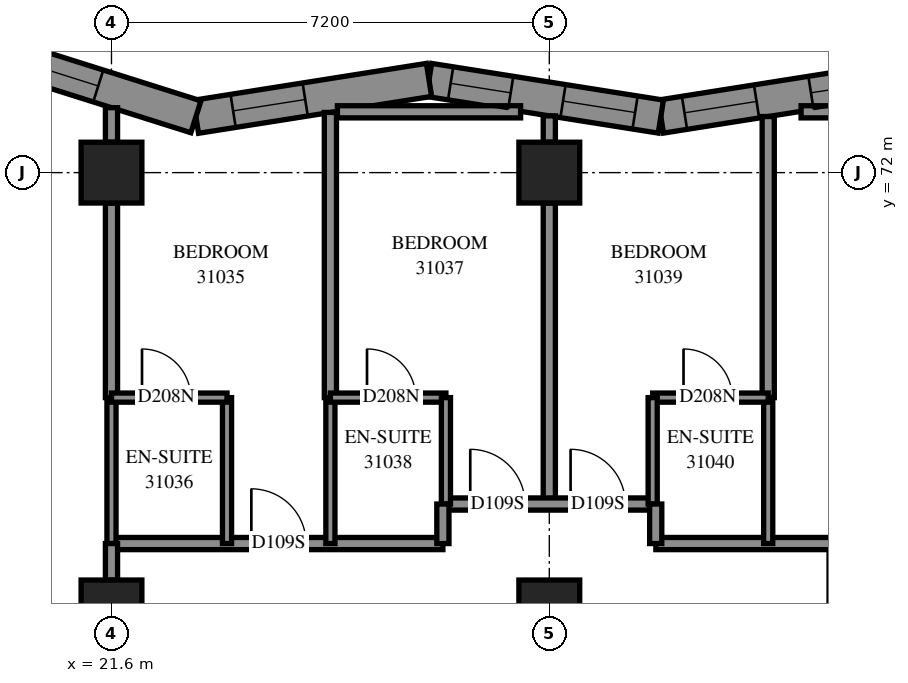
"""IFC4 building model, lengths in metres.
Left out: names, types, materials, properties, quantities, classifications, styles, units other than length and angle.
Written with IfcOpenShell. Run it as: python <this file> out.ifc"""

import sys

from ifc_helpers import new_model, si_unit, direction, frame, frame_2d, origin, origin_2d, place, context, subcontext, project, spatial, polyline, rectangle, outline, extrude, element, fill, save


model = new_model("IFC4")
c1 = context("Model", 3, precision=1e-05, world=origin(), true_north=direction((0.0, 1.0)))
c2 = subcontext(c1, "Body", "Model", "MODEL_VIEW")
j1 = project(units=[si_unit("LENGTHUNIT", "METRE"), si_unit("PLANEANGLEUNIT", "RADIAN")], contexts=[c1])
p1 = place(None, origin())
s1 = spatial("IfcSite", under=j1, at=p1, CompositionType="ELEMENT")
p2 = place(p1, origin())
s2 = spatial("IfcBuilding", under=s1, at=p2, CompositionType="ELEMENT")
p3 = place(p2, frame((0.0, 0.0, 115.2)))
s3 = spatial("IfcBuildingStorey", under=s2, at=p3, CompositionType="ELEMENT", Elevation=115.2)
for number, where, z_axis, x_axis in (
    (1, (21.6, 64.8, 0.0), (0.0, 0.0, 1.0), (1.0, 0.0, 0.0)),
    (2, (21.6, 72.0, 0.0), (0.0, 0.0, 1.0), (1.0, 0.0, 0.0)),
    (3, (28.8, 64.8, 0.0), (0.0, 0.0, 1.0), (1.0, 0.0, 0.0)),
    (4, (28.8, 72.0, 0.0), (0.0, 0.0, 1.0), (1.0, 0.0, 0.0)),
):
    element("IfcColumn", number, at=place(p3, frame(where, z_axis=z_axis, x_axis=x_axis)), inside=s3, PredefinedType="COLUMN", context=c2, shape_type="SweptSolid", body=[
        extrude(rectangle(XDim=1.0, YDim=1.0, at=origin_2d()), origin(), (0.0, 0.0, 1.0), 3.1),
    ])
p4 = place(p3, frame((34.447, 73.525, 0.0), z_axis=(0.0, 0.0, 1.0), x_axis=(-0.9877213372, -0.1562259905, 0.0)))
e5 = element("IfcWall", 5, at=p4, inside=s3, PredefinedType="SOLIDWALL", context=c2, shape_type="SweptSolid", body=[
    extrude(outline(polyline([(-0.043, -0.275), (3.816, -0.275), (3.903, 0.275), (0.043, 0.275), (-0.043, -0.275)])), origin(), (0.0, 0.0, 1.0), 3.1),
])
p5 = place(p4, frame((2.266, 0.0, 0.5)))
e6 = element("IfcOpeningElement", 6, at=p5, cuts=e5, PredefinedType="OPENING", context=c2, shape_type="SweptSolid", body=[
    extrude(rectangle(XDim=1.2, YDim=2.45, at=frame_2d((0.6, 1.225))), frame((0.0, 0.285, 0.0), z_axis=(0.0, -1.0, 0.0), x_axis=(1.0, 0.0, 0.0)), (0.0, 0.0, 1.0), 0.57),
])
p6 = place(p4, frame((0.36, 0.0, 0.45)))
e7 = element("IfcOpeningElement", 7, at=p6, cuts=e5, PredefinedType="OPENING", context=c2, shape_type="SweptSolid", body=[
    extrude(rectangle(XDim=1.0, YDim=2.5, at=frame_2d((0.5, 1.25))), frame((0.0, 0.285, 0.0), z_axis=(0.0, -1.0, 0.0), x_axis=(1.0, 0.0, 0.0)), (0.0, 0.0, 1.0), 0.57),
])
p7 = place(p3, frame((30.634, 72.922, 0.0), z_axis=(0.0, 0.0, 1.0), x_axis=(-0.9877213372, 0.1562259905, 0.0)))
e8 = element("IfcWall", 8, at=p7, inside=s3, PredefinedType="SOLIDWALL", context=c2, shape_type="SweptSolid", body=[
    extrude(outline(polyline([(0.043, -0.275), (3.903, -0.275), (3.816, 0.275), (-0.043, 0.275), (0.043, -0.275)])), origin(), (0.0, 0.0, 1.0), 3.1),
])
p8 = place(p7, frame((0.428, 0.0, 0.5)))
e9 = element("IfcOpeningElement", 9, at=p8, cuts=e8, PredefinedType="OPENING", context=c2, shape_type="SweptSolid", body=[
    extrude(rectangle(XDim=1.2, YDim=2.45, at=frame_2d((0.6, 1.225))), frame((0.0, 0.285, 0.0), z_axis=(0.0, -1.0, 0.0), x_axis=(1.0, 0.0, 0.0)), (0.0, 0.0, 1.0), 0.57),
])
p9 = place(p7, frame((2.5, 0.0, 0.45)))
e10 = element("IfcOpeningElement", 10, at=p9, cuts=e8, PredefinedType="OPENING", context=c2, shape_type="SweptSolid", body=[
    extrude(rectangle(XDim=1.0, YDim=2.5, at=frame_2d((0.5, 1.25))), frame((0.0, 0.285, 0.0), z_axis=(0.0, -1.0, 0.0), x_axis=(1.0, 0.0, 0.0)), (0.0, 0.0, 1.0), 0.57),
])
p10 = place(p3, frame((26.822, 73.525, 0.0), z_axis=(0.0, 0.0, 1.0), x_axis=(-0.9877221932, -0.1562205785, 0.0)))
e11 = element("IfcWall", 11, at=p10, inside=s3, PredefinedType="SOLIDWALL", context=c2, shape_type="SweptSolid", body=[
    extrude(outline(polyline([(-0.043, -0.275), (3.816, -0.275), (3.946, 0.275), (0.043, 0.275), (-0.043, -0.275)])), origin(), (0.0, 0.0, 1.0), 3.1),
])
p11 = place(p10, frame((2.062, 0.0, 0.5)))
e12 = element("IfcOpeningElement", 12, at=p11, cuts=e11, PredefinedType="OPENING", context=c2, shape_type="SweptSolid", body=[
    extrude(rectangle(XDim=1.2, YDim=2.45, at=frame_2d((0.6, 1.225))), frame((0.0, 0.285, 0.0), z_axis=(0.0, -1.0, 0.0), x_axis=(1.0, 0.0, 0.0)), (0.0, 0.0, 1.0), 0.57),
])
p12 = place(p3, frame((22.988, 72.918, 0.0), z_axis=(0.0, 0.0, 1.0), x_axis=(-0.9536482224, 0.3009236912, 0.0)))
e13 = element("IfcWall", 13, at=p12, inside=s3, PredefinedType="SOLIDWALL", context=c2, shape_type="SweptSolid", body=[
    extrude(outline(polyline([(0.065, -0.275), (4.062, -0.275), (3.312, 0.275), (-0.065, 0.275), (0.065, -0.275)])), origin(), (0.0, 0.0, 1.0), 3.1),
])
p13 = place(p12, frame((1.684, 0.0, 0.5)))
e14 = element("IfcOpeningElement", 14, at=p13, cuts=e13, PredefinedType="OPENING", context=c2, shape_type="SweptSolid", body=[
    extrude(rectangle(XDim=1.2, YDim=2.45, at=frame_2d((0.6, 1.225))), frame((0.0, 0.285, 0.0), z_axis=(0.0, -1.0, 0.0), x_axis=(1.0, 0.0, 0.0)), (0.0, 0.0, 1.0), 0.57),
])
p14 = place(p3, frame((21.6, 65.9, 0.0), z_axis=(0.0, 0.0, 1.0), x_axis=(1.0, 0.0, 0.0)))
e15 = element("IfcWall", 15, at=p14, inside=s3, PredefinedType="PARTITIONING", context=c2, shape_type="SweptSolid", body=[
    extrude(rectangle(XDim=5.45, YDim=0.2, at=frame_2d((2.725, 0.0))), origin(), (0.0, 0.0, 1.0), 3.1),
])
p15 = place(p14, frame((2.3, 0.0, 0.0)))
e16 = element("IfcOpeningElement", 16, at=p15, cuts=e15, PredefinedType="OPENING", context=c2, shape_type="SweptSolid", body=[
    extrude(rectangle(XDim=0.9, YDim=2.1, at=frame_2d((0.45, 1.05))), frame((0.0, 0.11, 0.0), z_axis=(0.0, -1.0, 0.0), x_axis=(1.0, 0.0, 0.0)), (0.0, 0.0, 1.0), 0.22),
])
p16 = place(p3, frame((28.8, 66.55, 0.0), z_axis=(0.0, 0.0, 1.0), x_axis=(0.0, 1.0, 0.0)))
e17 = element("IfcWall", 17, at=p16, inside=s3, PredefinedType="PARTITIONING", context=c2, shape_type="SweptSolid", body=[
    extrude(rectangle(XDim=4.95, YDim=0.2, at=frame_2d((2.475, 0.0))), origin(), (0.0, 0.0, 1.0), 3.1),
])
p17 = place(p3, frame((25.2, 68.3, 0.0), z_axis=(0.0, 0.0, 1.0), x_axis=(0.0, 1.0, 0.0)))
e18 = element("IfcWall", 18, at=p17, inside=s3, PredefinedType="PARTITIONING", context=c2, shape_type="SweptSolid", body=[
    extrude(rectangle(XDim=4.69, YDim=0.2, at=frame_2d((2.345, 0.0))), origin(), (0.0, 0.0, 1.0), 3.1),
])
p18 = place(p3, frame((32.4, 68.3, 0.0), z_axis=(0.0, 0.0, 1.0), x_axis=(0.0, 1.0, 0.0)))
e19 = element("IfcWall", 19, at=p18, inside=s3, PredefinedType="PARTITIONING", context=c2, shape_type="SweptSolid", body=[
    extrude(rectangle(XDim=4.622, YDim=0.2, at=frame_2d((2.311, 0.0))), origin(), (0.0, 0.0, 1.0), 3.1),
])
p19 = place(p3, frame((27.1, 66.55, 0.0), z_axis=(0.0, 0.0, 1.0), x_axis=(1.0, 0.0, 0.0)))
e20 = element("IfcWall", 20, at=p19, inside=s3, PredefinedType="PARTITIONING", context=c2, shape_type="SweptSolid", body=[
    extrude(rectangle(XDim=3.4, YDim=0.2, at=frame_2d((1.7, 0.0))), origin(), (0.0, 0.0, 1.0), 3.1),
])
p20 = place(p19, frame((0.4, 0.0, 0.0)))
e21 = element("IfcOpeningElement", 21, at=p20, cuts=e20, PredefinedType="OPENING", context=c2, shape_type="SweptSolid", body=[
    extrude(rectangle(XDim=0.9, YDim=2.1, at=frame_2d((0.45, 1.05))), frame((0.0, 0.11, 0.0), z_axis=(0.0, -1.0, 0.0), x_axis=(1.0, 0.0, 0.0)), (0.0, 0.0, 1.0), 0.22),
])
p21 = place(p19, frame((2.05, 0.0, 0.0)))
e22 = element("IfcOpeningElement", 22, at=p21, cuts=e20, PredefinedType="OPENING", context=c2, shape_type="SweptSolid", body=[
    extrude(rectangle(XDim=0.9, YDim=2.1, at=frame_2d((0.45, 1.05))), frame((0.0, 0.11, 0.0), z_axis=(0.0, -1.0, 0.0), x_axis=(1.0, 0.0, 0.0)), (0.0, 0.0, 1.0), 0.22),
])
p22 = place(p3, frame((21.6, 68.3, 0.0), z_axis=(0.0, 0.0, 1.0), x_axis=(0.0, 1.0, 0.0)))
e23 = element("IfcWall", 23, at=p22, inside=s3, PredefinedType="PARTITIONING", context=c2, shape_type="SweptSolid", body=[
    extrude(rectangle(XDim=3.2, YDim=0.2, at=frame_2d((1.6, 0.0))), origin(), (0.0, 0.0, 1.0), 2.6),
])
for number, where, z_axis, x_axis in (
    (24, (25.316, 73.0, 0.0), (0.0, 0.0, 1.0), (1.0, 0.0, 0.0)),
    (25, (32.94, 73.0, 0.0), (0.0, 0.0, 1.0), (1.0, 0.0, 0.0)),
):
    element("IfcWall", number, at=place(p3, frame(where, z_axis=z_axis, x_axis=x_axis)), inside=s3, PredefinedType="PARTITIONING", context=c2, shape_type="SweptSolid", body=[
        extrude(rectangle(XDim=3.013, YDim=0.2, at=frame_2d((1.506, 0.0))), origin(), (0.0, 0.0, 1.0), 3.1),
    ])
p23 = place(p3, frame((30.552, 65.9, 0.0), z_axis=(0.0, 0.0, 1.0), x_axis=(1.0, 0.0, 0.0)))
e26 = element("IfcWall", 26, at=p23, inside=s3, PredefinedType="PARTITIONING", context=c2, shape_type="SweptSolid", body=[
    extrude(rectangle(XDim=2.948, YDim=0.2, at=frame_2d((1.474, 0.0))), origin(), (0.0, 0.0, 1.0), 3.1),
])
p24 = place(p3, frame((21.6, 65.9, 0.0), z_axis=(0.0, 0.0, 1.0), x_axis=(0.0, 1.0, 0.0)))
e27 = element("IfcWall", 27, at=p24, inside=s3, PredefinedType="PARTITIONING", context=c2, shape_type="SweptSolid", body=[
    extrude(rectangle(XDim=2.4, YDim=0.15, at=frame_2d((1.2, 0.0))), origin(), (0.0, 0.0, 1.0), 2.6),
])
for number, where, z_axis, x_axis in (
    (28, (23.5, 65.9, 0.0), (0.0, 0.0, 1.0), (0.0, 1.0, 0.0)),
    (29, (25.2, 65.9, 0.0), (0.0, 0.0, 1.0), (0.0, 1.0, 0.0)),
    (30, (32.4, 65.9, 0.0), (0.0, 0.0, 1.0), (0.0, 1.0, 0.0)),
):
    element("IfcWall", number, at=place(p3, frame(where, z_axis=z_axis, x_axis=x_axis)), inside=s3, PredefinedType="PARTITIONING", context=c2, shape_type="SweptSolid", body=[
        extrude(rectangle(XDim=2.4, YDim=0.15, at=frame_2d((1.2, 0.0))), origin(), (0.0, 0.0, 1.0), 3.1),
    ])
p25 = place(p3, frame((25.2, 68.3, 0.0), z_axis=(0.0, 0.0, 1.0), x_axis=(1.0, 0.0, 0.0)))
e31 = element("IfcWall", 31, at=p25, inside=s3, PredefinedType="PARTITIONING", context=c2, shape_type="SweptSolid", body=[
    extrude(rectangle(XDim=1.9, YDim=0.15, at=frame_2d((0.95, 0.0))), origin(), (0.0, 0.0, 1.0), 3.1),
])
p26 = place(p25, frame((0.602, 0.0, 0.0)))
e32 = element("IfcOpeningElement", 32, at=p26, cuts=e31, PredefinedType="OPENING", context=c2, shape_type="SweptSolid", body=[
    extrude(rectangle(XDim=0.8, YDim=2.1, at=frame_2d((0.4, 1.05))), frame((0.0, 0.085, 0.0), z_axis=(0.0, -1.0, 0.0), x_axis=(1.0, 0.0, 0.0)), (0.0, 0.0, 1.0), 0.17),
])
p27 = place(p3, frame((21.6, 68.3, 0.0), z_axis=(0.0, 0.0, 1.0), x_axis=(1.0, 0.0, 0.0)))
e33 = element("IfcWall", 33, at=p27, inside=s3, PredefinedType="PARTITIONING", context=c2, shape_type="SweptSolid", body=[
    extrude(rectangle(XDim=1.9, YDim=0.15, at=frame_2d((0.95, 0.0))), origin(), (0.0, 0.0, 1.0), 3.1),
])
p28 = place(p27, frame((0.502, 0.0, 0.0)))
e34 = element("IfcOpeningElement", 34, at=p28, cuts=e33, PredefinedType="OPENING", context=c2, shape_type="SweptSolid", body=[
    extrude(rectangle(XDim=0.8, YDim=2.1, at=frame_2d((0.4, 1.05))), frame((0.0, 0.085, 0.0), z_axis=(0.0, -1.0, 0.0), x_axis=(1.0, 0.0, 0.0)), (0.0, 0.0, 1.0), 0.17),
])
p29 = place(p3, frame((30.5, 68.3, 0.0), z_axis=(0.0, 0.0, 1.0), x_axis=(1.0, 0.0, 0.0)))
e35 = element("IfcWall", 35, at=p29, inside=s3, PredefinedType="PARTITIONING", context=c2, shape_type="SweptSolid", body=[
    extrude(rectangle(XDim=1.9, YDim=0.15, at=frame_2d((0.95, 0.0))), origin(), (0.0, 0.0, 1.0), 3.1),
])
p30 = place(p29, frame((0.507, 0.0, 0.0)))
e36 = element("IfcOpeningElement", 36, at=p30, cuts=e35, PredefinedType="OPENING", context=c2, shape_type="SweptSolid", body=[
    extrude(rectangle(XDim=0.8, YDim=2.1, at=frame_2d((0.4, 1.05))), frame((0.0, 0.085, 0.0), z_axis=(0.0, -1.0, 0.0), x_axis=(1.0, 0.0, 0.0)), (0.0, 0.0, 1.0), 0.17),
])
for number, where, z_axis, x_axis in (
    (37, (27.1, 66.55, 0.0), (0.0, 0.0, 1.0), (0.0, 1.0, 0.0)),
    (38, (30.5, 66.55, 0.0), (0.0, 0.0, 1.0), (0.0, 1.0, 0.0)),
):
    element("IfcWall", number, at=place(p3, frame(where, z_axis=z_axis, x_axis=x_axis)), inside=s3, PredefinedType="PARTITIONING", context=c2, shape_type="SweptSolid", body=[
        extrude(rectangle(XDim=1.75, YDim=0.15, at=frame_2d((0.875, 0.0))), origin(), (0.0, 0.0, 1.0), 3.1),
    ])
for number, where, z_axis, x_axis in (
    (39, (27.05, 65.9, 0.0), (0.0, 0.0, 1.0), (0.0, 1.0, 0.0)),
    (40, (30.55, 65.9, 0.0), (0.0, 0.0, 1.0), (0.0, 1.0, 0.0)),
):
    element("IfcWall", number, at=place(p3, frame(where, z_axis=z_axis, x_axis=x_axis)), inside=s3, PredefinedType="PARTITIONING", context=c2, shape_type="SweptSolid", body=[
        extrude(rectangle(XDim=0.65, YDim=0.2, at=frame_2d((0.325, 0.0))), origin(), (0.0, 0.0, 1.0), 3.1),
    ])
p31 = place(p3, frame((21.6, 65.3, 0.0), z_axis=(0.0, 0.0, 1.0), x_axis=(0.0, 1.0, 0.0)))
e41 = element("IfcWall", 41, at=p31, inside=s3, PredefinedType="PARTITIONING", context=c2, shape_type="SweptSolid", body=[
    extrude(rectangle(XDim=0.6, YDim=0.2, at=frame_2d((0.3, 0.0))), origin(), (0.0, 0.0, 1.0), 2.6),
])
p32 = place(p3, frame((21.6, 72.5, 0.0), z_axis=(0.0, 0.0, 1.0), x_axis=(0.0, 1.0, 0.0)))
e42 = element("IfcWall", 42, at=p32, inside=s3, PredefinedType="PARTITIONING", context=c2, shape_type="SweptSolid", body=[
    extrude(rectangle(XDim=0.568, YDim=0.2, at=frame_2d((0.284, 0.0))), origin(), (0.0, 0.0, 1.0), 3.1),
])
p33 = place(p3, frame((28.8, 72.5, 0.0), z_axis=(0.0, 0.0, 1.0), x_axis=(0.0, 1.0, 0.0)))
e43 = element("IfcWall", 43, at=p33, inside=s3, PredefinedType="PARTITIONING", context=c2, shape_type="SweptSolid", body=[
    extrude(rectangle(XDim=0.433, YDim=0.2, at=frame_2d((0.217, 0.0))), origin(), (0.0, 0.0, 1.0), 3.1),
])
p34 = place(p5, origin())
e44 = element("IfcWindow", 44, at=p34, inside=s3, PartitioningType="SINGLE_PANEL", PredefinedType="WINDOW", context=c2, shape_type="SweptSolid", body=[
    extrude(rectangle(XDim=1.2, YDim=2.45, at=frame_2d((0.6, 1.225))), frame((0.0, 0.155, 0.0), z_axis=(0.0, -1.0, 0.0), x_axis=(1.0, 0.0, 0.0)), (0.0, 0.0, 1.0), 0.06),
])
fill(e6, e44)
p35 = place(p8, origin())
e45 = element("IfcWindow", 45, at=p35, inside=s3, PartitioningType="SINGLE_PANEL", PredefinedType="WINDOW", context=c2, shape_type="SweptSolid", body=[
    extrude(rectangle(XDim=1.2, YDim=2.45, at=frame_2d((0.6, 1.225))), frame((0.0, 0.155, 0.0), z_axis=(0.0, -1.0, 0.0), x_axis=(1.0, 0.0, 0.0)), (0.0, 0.0, 1.0), 0.06),
])
fill(e9, e45)
p36 = place(p11, origin())
e46 = element("IfcWindow", 46, at=p36, inside=s3, PartitioningType="SINGLE_PANEL", PredefinedType="WINDOW", context=c2, shape_type="SweptSolid", body=[
    extrude(rectangle(XDim=1.2, YDim=2.45, at=frame_2d((0.6, 1.225))), frame((0.0, 0.155, 0.0), z_axis=(0.0, -1.0, 0.0), x_axis=(1.0, 0.0, 0.0)), (0.0, 0.0, 1.0), 0.06),
])
fill(e12, e46)
p37 = place(p13, origin())
e47 = element("IfcWindow", 47, at=p37, inside=s3, PartitioningType="SINGLE_PANEL", PredefinedType="WINDOW", context=c2, shape_type="SweptSolid", body=[
    extrude(rectangle(XDim=1.2, YDim=2.45, at=frame_2d((0.6, 1.225))), frame((0.0, 0.155, 0.0), z_axis=(0.0, -1.0, 0.0), x_axis=(1.0, 0.0, 0.0)), (0.0, 0.0, 1.0), 0.06),
])
fill(e14, e47)
p38 = place(p15, origin())
e48 = element("IfcDoor", 48, at=p38, inside=s3, OperationType="SINGLE_SWING_RIGHT", PredefinedType="DOOR", context=c2, shape_type="SweptSolid", body=[
    extrude(rectangle(XDim=0.9, YDim=2.1, at=frame_2d((0.45, 1.05))), frame((0.0, 0.025, 0.0), z_axis=(0.0, -1.0, 0.0), x_axis=(1.0, 0.0, 0.0)), (0.0, 0.0, 1.0), 0.05),
])
fill(e16, e48)
p39 = place(p28, origin())
e49 = element("IfcDoor", 49, at=p39, inside=s3, OperationType="SINGLE_SWING_RIGHT", PredefinedType="DOOR", context=c2, shape_type="SweptSolid", body=[
    extrude(rectangle(XDim=0.8, YDim=2.1, at=frame_2d((0.4, 1.05))), frame((0.0, 0.025, 0.0), z_axis=(0.0, -1.0, 0.0), x_axis=(1.0, 0.0, 0.0)), (0.0, 0.0, 1.0), 0.05),
])
fill(e34, e49)
p40 = place(p20, origin())
e50 = element("IfcDoor", 50, at=p40, inside=s3, OperationType="SINGLE_SWING_LEFT", PredefinedType="DOOR", context=c2, shape_type="SweptSolid", body=[
    extrude(rectangle(XDim=0.9, YDim=2.1, at=frame_2d((0.45, 1.05))), frame((0.0, 0.025, 0.0), z_axis=(0.0, -1.0, 0.0), x_axis=(1.0, 0.0, 0.0)), (0.0, 0.0, 1.0), 0.05),
])
fill(e21, e50)
p41 = place(p26, origin())
e51 = element("IfcDoor", 51, at=p41, inside=s3, OperationType="SINGLE_SWING_RIGHT", PredefinedType="DOOR", context=c2, shape_type="SweptSolid", body=[
    extrude(rectangle(XDim=0.8, YDim=2.1, at=frame_2d((0.4, 1.05))), frame((0.0, 0.025, 0.0), z_axis=(0.0, -1.0, 0.0), x_axis=(1.0, 0.0, 0.0)), (0.0, 0.0, 1.0), 0.05),
])
fill(e32, e51)
p42 = place(p21, origin())
e52 = element("IfcDoor", 52, at=p42, inside=s3, OperationType="SINGLE_SWING_RIGHT", PredefinedType="DOOR", context=c2, shape_type="SweptSolid", body=[
    extrude(rectangle(XDim=0.9, YDim=2.1, at=frame_2d((0.45, 1.05))), frame((0.0, 0.025, 0.0), z_axis=(0.0, -1.0, 0.0), x_axis=(1.0, 0.0, 0.0)), (0.0, 0.0, 1.0), 0.05),
])
fill(e22, e52)
p43 = place(p30, origin())
e53 = element("IfcDoor", 53, at=p43, inside=s3, OperationType="SINGLE_SWING_RIGHT", PredefinedType="DOOR", context=c2, shape_type="SweptSolid", body=[
    extrude(rectangle(XDim=0.8, YDim=2.1, at=frame_2d((0.4, 1.05))), frame((0.0, 0.025, 0.0), z_axis=(0.0, -1.0, 0.0), x_axis=(1.0, 0.0, 0.0)), (0.0, 0.0, 1.0), 0.05),
])
fill(e36, e53)
p44 = place(p6, origin())
e54 = element("IfcWindow", 54, at=p44, inside=s3, PartitioningType="SINGLE_PANEL", PredefinedType="WINDOW", context=c2, shape_type="SweptSolid", body=[
    extrude(rectangle(XDim=1.0, YDim=2.5, at=frame_2d((0.5, 1.25))), frame((0.0, 0.155, 0.0), z_axis=(0.0, -1.0, 0.0), x_axis=(1.0, 0.0, 0.0)), (0.0, 0.0, 1.0), 0.06),
])
fill(e7, e54)
p45 = place(p9, origin())
e55 = element("IfcWindow", 55, at=p45, inside=s3, PartitioningType="SINGLE_PANEL", PredefinedType="WINDOW", context=c2, shape_type="SweptSolid", body=[
    extrude(rectangle(XDim=1.0, YDim=2.5, at=frame_2d((0.5, 1.25))), frame((0.0, 0.155, 0.0), z_axis=(0.0, -1.0, 0.0), x_axis=(1.0, 0.0, 0.0)), (0.0, 0.0, 1.0), 0.06),
])
fill(e10, e55)
save(model, sys.argv[1])
